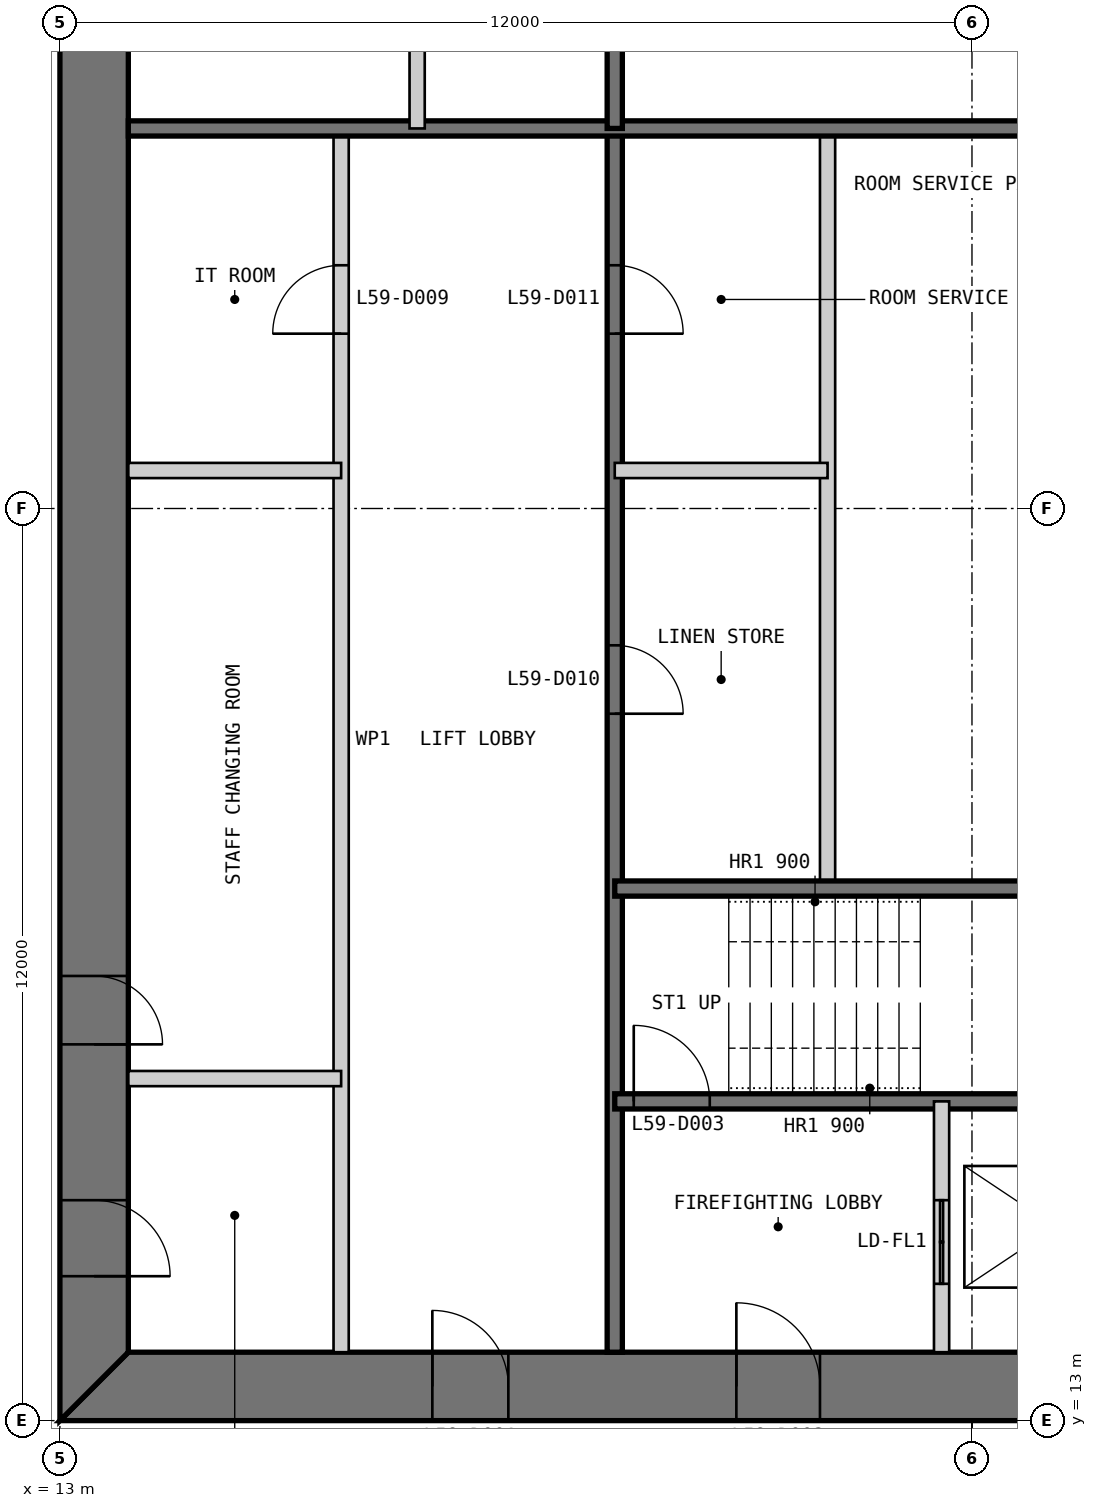
"""IFC4 building model, lengths in metres.
Left out: names, types, materials, properties, quantities, classifications, styles, units other than length and angle.
Written with IfcOpenShell. Run it as: python <this file> out.ifc"""

import sys

from ifc_helpers import new_model, si_unit, direction, frame, frame_2d, origin, place, context, subcontext, project, spatial, polyline, rectangle, outline, extrude, element, fill, save


model = new_model("IFC4")
c1 = context("Model", 3, precision=1e-05, world=origin(), true_north=direction((0.0, 1.0)))
c2 = subcontext(c1, "Body", "Model", "MODEL_VIEW")
j1 = project(units=[si_unit("LENGTHUNIT", "METRE"), si_unit("PLANEANGLEUNIT", "RADIAN")], contexts=[c1])
p1 = place(None, origin())
s1 = spatial("IfcSite", under=j1, at=p1, CompositionType="ELEMENT")
p2 = place(p1, origin())
s2 = spatial("IfcBuilding", under=s1, at=p2, CompositionType="ELEMENT")
p3 = place(p2, frame((0.0, 0.0, 252.6)))
s3 = spatial("IfcBuildingStorey", under=s2, at=p3, CompositionType="ELEMENT", Elevation=252.6)
p4 = place(p3, frame((13.0, 13.45, 0.0), z_axis=(0.0, 0.0, 1.0), x_axis=(1.0, 0.0, 0.0)))
e1 = element("IfcWall", 1, at=p4, inside=s3, PredefinedType="SHEAR", context=c2, shape_type="SweptSolid", body=[
    extrude(outline(polyline([(0.0, -0.45), (24.0, -0.45), (23.1, 0.45), (0.9, 0.45), (0.0, -0.45)])), origin(), (0.0, 0.0, 1.0), 3.4),
])
p5 = place(p4, frame((4.9, 0.0, 0.0)))
e2 = element("IfcOpeningElement", 2, at=p5, cuts=e1, PredefinedType="OPENING", context=c2, shape_type="SweptSolid", body=[
    extrude(rectangle(XDim=1.0, YDim=2.2, at=frame_2d((0.5, 1.1))), frame((0.0, 0.46, 0.0), z_axis=(0.0, -1.0, 0.0), x_axis=(1.0, 0.0, 0.0)), (0.0, 0.0, 1.0), 0.92),
])
p6 = place(p4, frame((8.9, 0.0, 0.0)))
e3 = element("IfcOpeningElement", 3, at=p6, cuts=e1, PredefinedType="OPENING", context=c2, shape_type="SweptSolid", body=[
    extrude(rectangle(XDim=1.1, YDim=2.2, at=frame_2d((0.55, 1.1))), frame((0.0, 0.46, 0.0), z_axis=(0.0, -1.0, 0.0), x_axis=(1.0, 0.0, 0.0)), (0.0, 0.0, 1.0), 0.92),
])
p7 = place(p4, frame((15.05, 0.0, 0.0)))
e4 = element("IfcOpeningElement", 4, at=p7, cuts=e1, PredefinedType="OPENING", context=c2, shape_type="SweptSolid", body=[
    extrude(rectangle(XDim=0.9, YDim=2.2, at=frame_2d((0.45, 1.1))), frame((0.0, 0.46, 0.0), z_axis=(0.0, -1.0, 0.0), x_axis=(1.0, 0.0, 0.0)), (0.0, 0.0, 1.0), 0.92),
])
p8 = place(p4, frame((17.9, 0.0, 0.0)))
e5 = element("IfcOpeningElement", 5, at=p8, cuts=e1, PredefinedType="OPENING", context=c2, shape_type="SweptSolid", body=[
    extrude(rectangle(XDim=1.0, YDim=2.2, at=frame_2d((0.5, 1.1))), frame((0.0, 0.46, 0.0), z_axis=(0.0, -1.0, 0.0), x_axis=(1.0, 0.0, 0.0)), (0.0, 0.0, 1.0), 0.92),
])
p9 = place(p4, frame((21.4, 0.0, 0.0)))
e6 = element("IfcOpeningElement", 6, at=p9, cuts=e1, PredefinedType="OPENING", context=c2, shape_type="SweptSolid", body=[
    extrude(rectangle(XDim=1.0, YDim=2.2, at=frame_2d((0.5, 1.1))), frame((0.0, 0.46, 0.0), z_axis=(0.0, -1.0, 0.0), x_axis=(1.0, 0.0, 0.0)), (0.0, 0.0, 1.0), 0.92),
])
p10 = place(p3, frame((13.45, 36.1, 0.0), z_axis=(0.0, 0.0, 1.0), x_axis=(0.0, -1.0, 0.0)))
e7 = element("IfcWall", 7, at=p10, inside=s3, PredefinedType="SHEAR", context=c2, shape_type="SweptSolid", body=[
    extrude(outline(polyline([(-0.9, -0.45), (23.1, -0.45), (22.2, 0.45), (0.0, 0.45), (-0.9, -0.45)])), origin(), (0.0, 0.0, 1.0), 3.4),
])
p11 = place(p10, frame((20.2, 0.0, 0.0)))
e8 = element("IfcOpeningElement", 8, at=p11, cuts=e7, PredefinedType="OPENING", context=c2, shape_type="SweptSolid", body=[
    extrude(rectangle(XDim=1.0, YDim=2.2, at=frame_2d((0.5, 1.1))), frame((0.0, 0.46, 0.0), z_axis=(0.0, -1.0, 0.0), x_axis=(1.0, 0.0, 0.0)), (0.0, 0.0, 1.0), 0.92),
])
p12 = place(p10, frame((17.25, 0.0, 0.0)))
e9 = element("IfcOpeningElement", 9, at=p12, cuts=e7, PredefinedType="OPENING", context=c2, shape_type="SweptSolid", body=[
    extrude(rectangle(XDim=0.9, YDim=2.2, at=frame_2d((0.45, 1.1))), frame((0.0, 0.46, 0.0), z_axis=(0.0, -1.0, 0.0), x_axis=(1.0, 0.0, 0.0)), (0.0, 0.0, 1.0), 0.92),
])
p13 = place(p3, frame((16.7, 13.9, 0.0), z_axis=(0.0, 0.0, 1.0), x_axis=(0.0, 1.0, 0.0)))
e10 = element("IfcWall", 10, at=p13, inside=s3, PredefinedType="PARTITIONING", context=c2, shape_type="SweptSolid", body=[
    extrude(rectangle(XDim=16.1, YDim=0.2, at=frame_2d((8.05, 0.0))), origin(), (0.0, 0.0, 1.0), 3.2),
])
p14 = place(p13, frame((13.4, 0.0, 0.0)))
e11 = element("IfcOpeningElement", 11, at=p14, cuts=e10, PredefinedType="OPENING", context=c2, shape_type="SweptSolid", body=[
    extrude(rectangle(XDim=0.9, YDim=2.2, at=frame_2d((0.45, 1.1))), frame((0.0, 0.11, 0.0), z_axis=(0.0, -1.0, 0.0), x_axis=(1.0, 0.0, 0.0)), (0.0, 0.0, 1.0), 0.22),
])
p15 = place(p3, frame((20.3, 13.9, 0.0), z_axis=(0.0, 0.0, 1.0), x_axis=(0.0, 1.0, 0.0)))
e12 = element("IfcWall", 12, at=p15, inside=s3, PredefinedType="SOLIDWALL", context=c2, shape_type="SweptSolid", body=[
    extrude(rectangle(XDim=16.1, YDim=0.2, at=frame_2d((8.05, 0.0))), origin(), (0.0, 0.0, 1.0), 3.2),
])
p16 = place(p15, frame((8.4, 0.0, 0.0)))
e13 = element("IfcOpeningElement", 13, at=p16, cuts=e12, PredefinedType="OPENING", context=c2, shape_type="SweptSolid", body=[
    extrude(rectangle(XDim=0.9, YDim=2.2, at=frame_2d((0.45, 1.1))), frame((0.0, 0.11, 0.0), z_axis=(0.0, -1.0, 0.0), x_axis=(1.0, 0.0, 0.0)), (0.0, 0.0, 1.0), 0.22),
])
p17 = place(p15, frame((13.4, 0.0, 0.0)))
e14 = element("IfcOpeningElement", 14, at=p17, cuts=e12, PredefinedType="OPENING", context=c2, shape_type="SweptSolid", body=[
    extrude(rectangle(XDim=0.9, YDim=2.2, at=frame_2d((0.45, 1.1))), frame((0.0, 0.11, 0.0), z_axis=(0.0, -1.0, 0.0), x_axis=(1.0, 0.0, 0.0)), (0.0, 0.0, 1.0), 0.22),
])
p18 = place(p3, frame((23.1, 20.0, 0.0), z_axis=(0.0, 0.0, 1.0), x_axis=(0.0, 1.0, 0.0)))
e15 = element("IfcWall", 15, at=p18, inside=s3, PredefinedType="PARTITIONING", context=c2, shape_type="SweptSolid", body=[
    extrude(rectangle(XDim=10.0, YDim=0.2, at=frame_2d((5.0, 0.0))), origin(), (0.0, 0.0, 1.0), 3.2),
])
p19 = place(p3, frame((20.3, 17.2, 0.0), z_axis=(0.0, 0.0, 1.0), x_axis=(1.0, 0.0, 0.0)))
e16 = element("IfcWall", 16, at=p19, inside=s3, PredefinedType="SOLIDWALL", context=c2, shape_type="SweptSolid", body=[
    extrude(rectangle(XDim=9.4, YDim=0.2, at=frame_2d((4.7, 0.0))), origin(), (0.0, 0.0, 1.0), 3.2),
])
p20 = place(p19, frame((0.25, 0.0, 0.0)))
e17 = element("IfcOpeningElement", 17, at=p20, cuts=e16, PredefinedType="OPENING", context=c2, shape_type="SweptSolid", body=[
    extrude(rectangle(XDim=1.0, YDim=2.2, at=frame_2d((0.5, 1.1))), frame((0.0, 0.11, 0.0), z_axis=(0.0, -1.0, 0.0), x_axis=(1.0, 0.0, 0.0)), (0.0, 0.0, 1.0), 0.22),
])
p21 = place(p3, frame((20.3, 20.0, 0.0), z_axis=(0.0, 0.0, 1.0), x_axis=(1.0, 0.0, 0.0)))
e18 = element("IfcWall", 18, at=p21, inside=s3, PredefinedType="SOLIDWALL", context=c2, shape_type="SweptSolid", body=[
    extrude(rectangle(XDim=15.8, YDim=0.2, at=frame_2d((7.9, 0.0))), origin(), (0.0, 0.0, 1.0), 3.2),
])
p22 = place(p3, frame((24.6, 13.9, 0.0), z_axis=(0.0, 0.0, 1.0), x_axis=(0.0, 1.0, 0.0)))
e19 = element("IfcWall", 19, at=p22, inside=s3, PredefinedType="PARTITIONING", context=c2, shape_type="SweptSolid", body=[
    extrude(rectangle(XDim=3.3, YDim=0.2, at=frame_2d((1.65, 0.0))), origin(), (0.0, 0.0, 1.0), 3.2),
])
p23 = place(p22, frame((0.9, 0.0, 0.0)))
e20 = element("IfcOpeningElement", 20, at=p23, cuts=e19, PredefinedType="OPENING", context=c2, shape_type="SweptSolid", body=[
    extrude(rectangle(XDim=1.1, YDim=2.2, at=frame_2d((0.55, 1.1))), frame((0.0, 0.11, 0.0), z_axis=(0.0, -1.0, 0.0), x_axis=(1.0, 0.0, 0.0)), (0.0, 0.0, 1.0), 0.22),
])
for number, where, z_axis, x_axis in (
    (21, (13.9, 17.5, 0.0), (0.0, 0.0, 1.0), (1.0, 0.0, 0.0)),
    (22, (13.9, 25.5, 0.0), (0.0, 0.0, 1.0), (1.0, 0.0, 0.0)),
    (23, (20.3, 25.5, 0.0), (0.0, 0.0, 1.0), (1.0, 0.0, 0.0)),
):
    element("IfcWall", number, at=place(p3, frame(where, z_axis=z_axis, x_axis=x_axis)), inside=s3, PredefinedType="PARTITIONING", context=c2, shape_type="SweptSolid", body=[
        extrude(rectangle(XDim=2.8, YDim=0.2, at=frame_2d((1.4, 0.0))), origin(), (0.0, 0.0, 1.0), 3.2),
    ])
p24 = place(p3, frame((29.7, 30.0, 0.0), z_axis=(0.0, 0.0, 1.0), x_axis=(-1.0, 0.0, 0.0)))
e24 = element("IfcWall", 24, at=p24, inside=s3, PredefinedType="SOLIDWALL", context=c2, shape_type="SweptSolid", body=[
    extrude(rectangle(XDim=15.8, YDim=0.2, at=frame_2d((7.9, 0.0))), origin(), (0.0, 0.0, 1.0), 3.2),
])
p25 = place(p3, frame((20.3, 36.1, 0.0), z_axis=(0.0, 0.0, 1.0), x_axis=(0.0, -1.0, 0.0)))
e25 = element("IfcWall", 25, at=p25, inside=s3, PredefinedType="SOLIDWALL", context=c2, shape_type="SweptSolid", body=[
    extrude(rectangle(XDim=6.1, YDim=0.2, at=frame_2d((3.05, 0.0))), origin(), (0.0, 0.0, 1.0), 3.2),
])
p26 = place(p3, frame((17.7, 36.1, 0.0), z_axis=(0.0, 0.0, 1.0), x_axis=(0.0, -1.0, 0.0)))
e26 = element("IfcWall", 26, at=p26, inside=s3, PredefinedType="PARTITIONING", context=c2, shape_type="SweptSolid", body=[
    extrude(rectangle(XDim=6.1, YDim=0.2, at=frame_2d((3.05, 0.0))), origin(), (0.0, 0.0, 1.0), 3.2),
])
p27 = place(p5, origin())
e27 = element("IfcDoor", 27, at=p27, inside=s3, OperationType="SINGLE_SWING_LEFT", PredefinedType="DOOR", context=c2, shape_type="SweptSolid", body=[
    extrude(rectangle(XDim=1.0, YDim=2.2, at=frame_2d((0.5, 1.1))), frame((0.0, 0.025, 0.0), z_axis=(0.0, -1.0, 0.0), x_axis=(1.0, 0.0, 0.0)), (0.0, 0.0, 1.0), 0.05),
    extrude(outline(polyline([(0.0, 0.0), (0.04, 0.0), (0.04, 2.16), (0.96, 2.16), (0.96, 0.0), (1.0, 0.0), (1.0, 2.2), (0.0, 2.2), (0.0, 0.0)])), frame((0.0, 0.3, 0.0), z_axis=(0.0, -1.0, 0.0), x_axis=(1.0, 0.0, 0.0)), (0.0, 0.0, 1.0), 0.6),
])
fill(e2, e27)
p28 = place(p6, origin())
e28 = element("IfcDoor", 28, at=p28, inside=s3, OperationType="SINGLE_SWING_LEFT", PredefinedType="DOOR", context=c2, shape_type="SweptSolid", body=[
    extrude(rectangle(XDim=1.1, YDim=2.2, at=frame_2d((0.55, 1.1))), frame((0.0, 0.025, 0.0), z_axis=(0.0, -1.0, 0.0), x_axis=(1.0, 0.0, 0.0)), (0.0, 0.0, 1.0), 0.05),
    extrude(outline(polyline([(0.0, 0.0), (0.04, 0.0), (0.04, 2.16), (1.06, 2.16), (1.06, 0.0), (1.1, 0.0), (1.1, 2.2), (0.0, 2.2), (0.0, 0.0)])), frame((0.0, 0.3, 0.0), z_axis=(0.0, -1.0, 0.0), x_axis=(1.0, 0.0, 0.0)), (0.0, 0.0, 1.0), 0.6),
])
fill(e3, e28)
p29 = place(p20, origin())
e29 = element("IfcDoor", 29, at=p29, inside=s3, OperationType="SINGLE_SWING_LEFT", PredefinedType="DOOR", context=c2, shape_type="SweptSolid", body=[
    extrude(rectangle(XDim=1.0, YDim=2.2, at=frame_2d((0.5, 1.1))), frame((0.0, 0.025, 0.0), z_axis=(0.0, -1.0, 0.0), x_axis=(1.0, 0.0, 0.0)), (0.0, 0.0, 1.0), 0.05),
])
fill(e17, e29)
p30 = place(p11, origin())
e30 = element("IfcDoor", 30, at=p30, inside=s3, OperationType="SINGLE_SWING_RIGHT", PredefinedType="DOOR", context=c2, shape_type="SweptSolid", body=[
    extrude(rectangle(XDim=1.0, YDim=2.2, at=frame_2d((0.5, 1.1))), frame((0.0, 0.025, 0.0), z_axis=(0.0, -1.0, 0.0), x_axis=(1.0, 0.0, 0.0)), (0.0, 0.0, 1.0), 0.05),
    extrude(outline(polyline([(0.0, 0.0), (0.04, 0.0), (0.04, 2.16), (0.96, 2.16), (0.96, 0.0), (1.0, 0.0), (1.0, 2.2), (0.0, 2.2), (0.0, 0.0)])), frame((0.0, 0.3, 0.0), z_axis=(0.0, -1.0, 0.0), x_axis=(1.0, 0.0, 0.0)), (0.0, 0.0, 1.0), 0.6),
])
fill(e8, e30)
p31 = place(p12, origin())
e31 = element("IfcDoor", 31, at=p31, inside=s3, OperationType="SINGLE_SWING_RIGHT", PredefinedType="DOOR", context=c2, shape_type="SweptSolid", body=[
    extrude(rectangle(XDim=0.9, YDim=2.2, at=frame_2d((0.45, 1.1))), frame((0.0, 0.025, 0.0), z_axis=(0.0, -1.0, 0.0), x_axis=(1.0, 0.0, 0.0)), (0.0, 0.0, 1.0), 0.05),
    extrude(outline(polyline([(0.0, 0.0), (0.04, 0.0), (0.04, 2.16), (0.86, 2.16), (0.86, 0.0), (0.9, 0.0), (0.9, 2.2), (0.0, 2.2), (0.0, 0.0)])), frame((0.0, 0.3, 0.0), z_axis=(0.0, -1.0, 0.0), x_axis=(1.0, 0.0, 0.0)), (0.0, 0.0, 1.0), 0.6),
])
fill(e9, e31)
p32 = place(p14, origin())
e32 = element("IfcDoor", 32, at=p32, inside=s3, OperationType="SINGLE_SWING_LEFT", PredefinedType="DOOR", context=c2, shape_type="SweptSolid", body=[
    extrude(rectangle(XDim=0.9, YDim=2.2, at=frame_2d((0.45, 1.1))), frame((0.0, 0.025, 0.0), z_axis=(0.0, -1.0, 0.0), x_axis=(1.0, 0.0, 0.0)), (0.0, 0.0, 1.0), 0.05),
])
fill(e11, e32)
p33 = place(p16, frame((0.9, 0.0, 0.0), z_axis=(0.0, 0.0, 1.0), x_axis=(-1.0, 0.0, 0.0)))
e33 = element("IfcDoor", 33, at=p33, inside=s3, OperationType="SINGLE_SWING_RIGHT", PredefinedType="DOOR", context=c2, shape_type="SweptSolid", body=[
    extrude(rectangle(XDim=0.9, YDim=2.2, at=frame_2d((0.45, 1.1))), frame((0.0, 0.025, 0.0), z_axis=(0.0, -1.0, 0.0), x_axis=(1.0, 0.0, 0.0)), (0.0, 0.0, 1.0), 0.05),
])
fill(e13, e33)
p34 = place(p17, frame((0.9, 0.0, 0.0), z_axis=(0.0, 0.0, 1.0), x_axis=(-1.0, 0.0, 0.0)))
e34 = element("IfcDoor", 34, at=p34, inside=s3, OperationType="SINGLE_SWING_RIGHT", PredefinedType="DOOR", context=c2, shape_type="SweptSolid", body=[
    extrude(rectangle(XDim=0.9, YDim=2.2, at=frame_2d((0.45, 1.1))), frame((0.0, 0.025, 0.0), z_axis=(0.0, -1.0, 0.0), x_axis=(1.0, 0.0, 0.0)), (0.0, 0.0, 1.0), 0.05),
])
fill(e14, e34)
p35 = place(p23, origin())
e35 = element("IfcDoor", 35, at=p35, inside=s3, OperationType="DOUBLE_DOOR_SLIDING", PredefinedType="DOOR", context=c2, shape_type="SweptSolid", body=[
    extrude(rectangle(XDim=1.1, YDim=2.2, at=frame_2d((0.55, 1.1))), frame((0.0, 0.025, 0.0), z_axis=(0.0, -1.0, 0.0), x_axis=(1.0, 0.0, 0.0)), (0.0, 0.0, 1.0), 0.05),
])
fill(e20, e35)
save(model, sys.argv[1])
